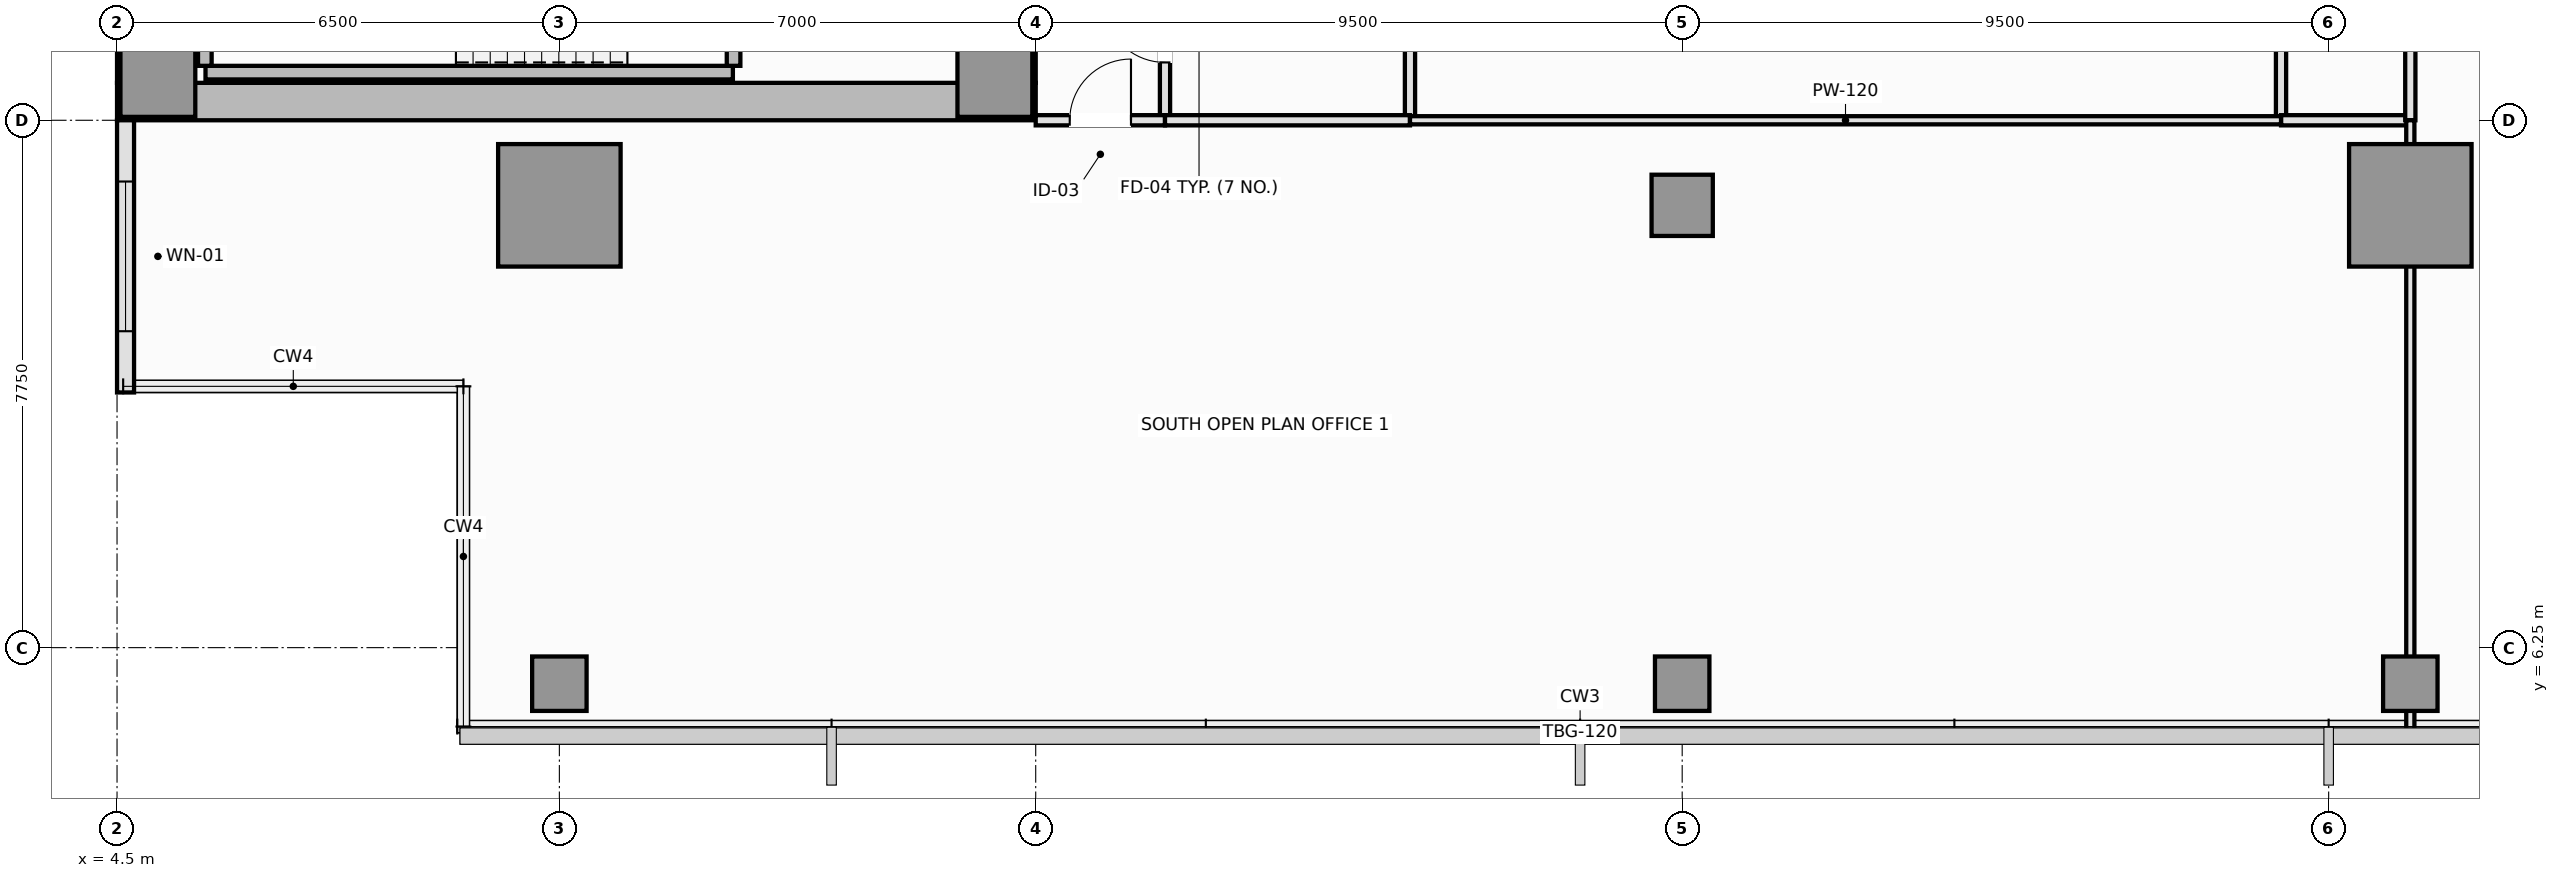
"""IFC4 building model, lengths in metres.
Left out: names, types, materials, properties, quantities, classifications, styles, units other than length and angle.
Written with IfcOpenShell. Run it as: python <this file> out.ifc"""

import sys

from ifc_helpers import new_model, si_unit, direction, frame, frame_2d, origin, origin_2d, place, context, subcontext, project, spatial, rectangle, extrude, element, fill, save


model = new_model("IFC4")
c1 = context("Model", 3, precision=1e-05, world=origin(), true_north=direction((0.0, 1.0)))
c2 = subcontext(c1, "Body", "Model", "MODEL_VIEW")
j1 = project(units=[si_unit("LENGTHUNIT", "METRE"), si_unit("PLANEANGLEUNIT", "RADIAN")], contexts=[c1])
p1 = place(None, origin())
s1 = spatial("IfcSite", under=j1, at=p1, CompositionType="ELEMENT")
p2 = place(p1, origin())
s2 = spatial("IfcBuilding", under=s1, at=p2, CompositionType="ELEMENT")
p3 = place(p2, frame((0.0, 0.0, 209.35)))
s3 = spatial("IfcBuildingStorey", under=s2, at=p3, CompositionType="ELEMENT", Elevation=209.35)
p4 = place(p3, frame((4.5, 14.275, 0.0), z_axis=(0.0, 0.0, 1.0), x_axis=(1.0, 0.0, 0.0)))
e1 = element("IfcWall", 1, at=p4, inside=s3, PredefinedType="SHEAR", context=c2, shape_type="SweptSolid", body=[
    extrude(rectangle(XDim=13.5, YDim=0.55, at=frame_2d((6.75, 0.0))), origin(), (0.0, 0.0, 1.0), 3.55),
])
p5 = place(p3, frame((4.775, 14.55, 0.0), z_axis=(0.0, 0.0, 1.0), x_axis=(0.0, 1.0, 0.0)))
e2 = element("IfcWall", 2, at=p5, inside=s3, PredefinedType="SHEAR", context=c2, shape_type="SweptSolid", body=[
    extrude(rectangle(XDim=21.4, YDim=0.55, at=frame_2d((10.7, 0.0))), origin(), (0.0, 0.0, 1.0), 3.55),
])
p6 = place(p3, frame((17.725, 14.55, 0.0), z_axis=(0.0, 0.0, 1.0), x_axis=(0.0, 1.0, 0.0)))
e3 = element("IfcWall", 3, at=p6, inside=s3, PredefinedType="SHEAR", context=c2, shape_type="SweptSolid", body=[
    extrude(rectangle(XDim=8.9, YDim=0.55, at=frame_2d((4.45, 0.0))), origin(), (0.0, 0.0, 1.0), 3.55),
])
p7 = place(p6, frame((4.35, 0.0, 0.0)))
e4 = element("IfcOpeningElement", 4, at=p7, cuts=e3, PredefinedType="OPENING", context=c2, shape_type="SweptSolid", body=[
    extrude(rectangle(XDim=1.1, YDim=2.15, at=frame_2d((0.55, 1.075))), frame((0.0, 0.285, 0.0), z_axis=(0.0, -1.0, 0.0), x_axis=(1.0, 0.0, 0.0)), (0.0, 0.0, 1.0), 0.57),
])
for number, where, z_axis, x_axis in (
    (5, (5.1, 14.6, 0.0), (0.0, 0.0, 1.0), (1.0, 0.0, 0.0)),
    (6, (17.4, 14.6, 0.0), (0.0, 0.0, 1.0), (1.0, 0.0, 0.0)),
):
    element("IfcColumn", number, at=place(p3, frame(where, z_axis=z_axis, x_axis=x_axis)), inside=s3, PredefinedType="PILASTER", context=c2, shape_type="SweptSolid", body=[
        extrude(rectangle(XDim=1.1, YDim=1.1, at=origin_2d()), origin(), (0.0, 0.0, 1.0), 3.55),
    ])
for number, where, z_axis, x_axis in (
    (7, (11.0, 12.75, 0.0), (0.0, 0.0, 1.0), (1.0, 0.0, 0.0)),
    (8, (38.2, 12.75, 0.0), (0.0, 0.0, 1.0), (1.0, 0.0, 0.0)),
):
    element("IfcColumn", number, at=place(p3, frame(where, z_axis=z_axis, x_axis=x_axis)), inside=s3, PredefinedType="COLUMN", context=c2, shape_type="SweptSolid", body=[
        extrude(rectangle(XDim=1.8, YDim=1.8, at=origin_2d()), origin(), (0.0, 0.0, 1.0), 3.55),
    ])
p8 = place(p3, frame((27.5, 12.75, 0.0), z_axis=(0.0, 0.0, 1.0), x_axis=(1.0, 0.0, 0.0)))
e9 = element("IfcColumn", 9, at=p8, inside=s3, PredefinedType="COLUMN", context=c2, shape_type="SweptSolid", body=[
    extrude(rectangle(XDim=0.9, YDim=0.9, at=origin_2d()), origin(), (0.0, 0.0, 1.0), 3.55),
])
for number, where, z_axis, x_axis in (
    (10, (11.0, 5.72, 0.0), (0.0, 0.0, 1.0), (1.0, 0.0, 0.0)),
    (11, (27.5, 5.72, 0.0), (0.0, 0.0, 1.0), (1.0, 0.0, 0.0)),
    (12, (38.2, 5.72, 0.0), (0.0, 0.0, 1.0), (1.0, 0.0, 0.0)),
):
    element("IfcColumn", number, at=place(p3, frame(where, z_axis=z_axis, x_axis=x_axis)), inside=s3, PredefinedType="COLUMN", context=c2, shape_type="SweptSolid", body=[
        extrude(rectangle(XDim=0.8, YDim=0.8, at=origin_2d()), origin(), (0.0, 0.0, 1.0), 3.55),
    ])
p9 = place(p3, frame((4.625, 14.0, 0.0), z_axis=(0.0, 0.0, 1.0), x_axis=(0.0, -1.0, 0.0)))
e13 = element("IfcWall", 13, at=p9, inside=s3, PredefinedType="SOLIDWALL", context=c2, shape_type="SweptSolid", body=[
    extrude(rectangle(XDim=4.0, YDim=0.25, at=frame_2d((2.0, 0.0))), origin(), (0.0, 0.0, 1.0), 3.37),
])
p10 = place(p9, frame((0.9, 0.0, 0.9)))
e14 = element("IfcOpeningElement", 14, at=p10, cuts=e13, PredefinedType="OPENING", context=c2, shape_type="SweptSolid", body=[
    extrude(rectangle(XDim=2.2, YDim=1.8, at=frame_2d((1.1, 0.9))), frame((0.0, 0.135, 0.0), z_axis=(0.0, -1.0, 0.0), x_axis=(1.0, 0.0, 0.0)), (0.0, 0.0, 1.0), 0.27),
])
p11 = place(p3, frame((5.8, 14.7, 0.0), z_axis=(0.0, 0.0, 1.0), x_axis=(1.0, 0.0, 0.0)))
e15 = element("IfcWall", 15, at=p11, inside=s3, PredefinedType="SOLIDWALL", context=c2, shape_type="SweptSolid", body=[
    extrude(rectangle(XDim=7.75, YDim=0.2, at=frame_2d((3.875, 0.0))), origin(), (0.0, 0.0, 1.0), 3.55),
])
p12 = place(p3, frame((5.79, 14.8, 0.0), z_axis=(0.0, 0.0, 1.0), x_axis=(0.0, 1.0, 0.0)))
e16 = element("IfcWall", 16, at=p12, inside=s3, PredefinedType="SOLIDWALL", context=c2, shape_type="SweptSolid", body=[
    extrude(rectangle(XDim=3.05, YDim=0.2, at=frame_2d((1.525, 0.0))), origin(), (0.0, 0.0, 1.0), 3.55),
])
p13 = place(p3, frame((13.56, 14.8, 0.0), z_axis=(0.0, 0.0, 1.0), x_axis=(0.0, 1.0, 0.0)))
e17 = element("IfcWall", 17, at=p13, inside=s3, PredefinedType="SOLIDWALL", context=c2, shape_type="SweptSolid", body=[
    extrude(rectangle(XDim=3.05, YDim=0.2, at=frame_2d((1.525, 0.0))), origin(), (0.0, 0.0, 1.0), 3.55),
])
p14 = place(p13, frame((0.95, 0.0, 0.0)))
e18 = element("IfcOpeningElement", 18, at=p14, cuts=e17, PredefinedType="OPENING", context=c2, shape_type="SweptSolid", body=[
    extrude(rectangle(XDim=1.15, YDim=2.15, at=frame_2d((0.575, 1.075))), frame((0.0, 0.11, 0.0), z_axis=(0.0, -1.0, 0.0), x_axis=(1.0, 0.0, 0.0)), (0.0, 0.0, 1.0), 0.22),
])
p15 = place(p3, frame((19.9, 14.0, 0.0), z_axis=(0.0, 0.0, 1.0), x_axis=(0.0, 1.0, 0.0)))
e19 = element("IfcWall", 19, at=p15, inside=s3, PredefinedType="PLUMBINGWALL", context=c2, shape_type="SweptSolid", body=[
    extrude(rectangle(XDim=2.6, YDim=0.15, at=frame_2d((1.3, 0.0))), origin(), (0.0, 0.0, 1.0), 3.37),
])
p16 = place(p15, frame((0.85, 0.0, 0.0)))
e20 = element("IfcOpeningElement", 20, at=p16, cuts=e19, PredefinedType="OPENING", context=c2, shape_type="SweptSolid", body=[
    extrude(rectangle(XDim=0.9, YDim=2.1, at=frame_2d((0.45, 1.05))), frame((0.0, 0.085, 0.0), z_axis=(0.0, -1.0, 0.0), x_axis=(1.0, 0.0, 0.0)), (0.0, 0.0, 1.0), 0.17),
])
p17 = place(p3, frame((18.0, 14.0, 0.0), z_axis=(0.0, 0.0, 1.0), x_axis=(1.0, 0.0, 0.0)))
e21 = element("IfcWall", 21, at=p17, inside=s3, PredefinedType="PARTITIONING", context=c2, shape_type="SweptSolid", body=[
    extrude(rectangle(XDim=1.9, YDim=0.15, at=frame_2d((0.95, 0.0))), origin(), (0.0, 0.0, 1.0), 3.37),
])
p18 = place(p17, frame((0.5, 0.0, 0.0)))
e22 = element("IfcOpeningElement", 22, at=p18, cuts=e21, PredefinedType="OPENING", context=c2, shape_type="SweptSolid", body=[
    extrude(rectangle(XDim=0.9, YDim=2.1, at=frame_2d((0.45, 1.05))), frame((0.0, 0.085, 0.0), z_axis=(0.0, -1.0, 0.0), x_axis=(1.0, 0.0, 0.0)), (0.0, 0.0, 1.0), 0.17),
])
p19 = place(p3, frame((36.3, 14.0, 0.0), z_axis=(0.0, 0.0, 1.0), x_axis=(0.0, 1.0, 0.0)))
e23 = element("IfcWall", 23, at=p19, inside=s3, PredefinedType="PARTITIONING", context=c2, shape_type="SweptSolid", body=[
    extrude(rectangle(XDim=4.7, YDim=0.15, at=frame_2d((2.35, 0.0))), origin(), (0.0, 0.0, 1.0), 3.37),
])
p20 = place(p19, frame((1.85, 0.0, 0.0)))
e24 = element("IfcOpeningElement", 24, at=p20, cuts=e23, PredefinedType="OPENING", context=c2, shape_type="SweptSolid", body=[
    extrude(rectangle(XDim=1.0, YDim=2.15, at=frame_2d((0.5, 1.075))), frame((0.0, 0.085, 0.0), z_axis=(0.0, -1.0, 0.0), x_axis=(1.0, 0.0, 0.0)), (0.0, 0.0, 1.0), 0.17),
])
p21 = place(p3, frame((36.3, 14.0, 0.0), z_axis=(0.0, 0.0, 1.0), x_axis=(1.0, 0.0, 0.0)))
e25 = element("IfcWall", 25, at=p21, inside=s3, PredefinedType="PARTITIONING", context=c2, shape_type="SweptSolid", body=[
    extrude(rectangle(XDim=1.9, YDim=0.15, at=frame_2d((0.95, 0.0))), origin(), (0.0, 0.0, 1.0), 3.37),
])
p22 = place(p3, frame((38.2, 14.0, 0.0), z_axis=(0.0, 0.0, 1.0), x_axis=(0.0, 1.0, 0.0)))
e26 = element("IfcWall", 26, at=p22, inside=s3, PredefinedType="PARTITIONING", context=c2, shape_type="SweptSolid", body=[
    extrude(rectangle(XDim=6.8, YDim=0.15, at=frame_2d((3.4, 0.0))), origin(), (0.0, 0.0, 1.0), 2.92),
])
p23 = place(p22, frame((2.679, 0.0, 0.0)))
e27 = element("IfcOpeningElement", 27, at=p23, cuts=e26, PredefinedType="OPENING", context=c2, shape_type="SweptSolid", body=[
    extrude(rectangle(XDim=1.0, YDim=2.15, at=frame_2d((0.5, 1.075))), frame((0.0, 0.085, 0.0), z_axis=(0.0, -1.0, 0.0), x_axis=(1.0, 0.0, 0.0)), (0.0, 0.0, 1.0), 0.17),
])
p24 = place(p3, frame((23.5, 14.0, 0.0), z_axis=(0.0, 0.0, 1.0), x_axis=(0.0, 1.0, 0.0)))
e28 = element("IfcWall", 28, at=p24, inside=s3, PredefinedType="PLUMBINGWALL", context=c2, shape_type="SweptSolid", body=[
    extrude(rectangle(XDim=2.6, YDim=0.15, at=frame_2d((1.3, 0.0))), origin(), (0.0, 0.0, 1.0), 3.37),
])
p25 = place(p3, frame((19.9, 14.0, 0.0), z_axis=(0.0, 0.0, 1.0), x_axis=(1.0, 0.0, 0.0)))
e29 = element("IfcWall", 29, at=p25, inside=s3, PredefinedType="PLUMBINGWALL", context=c2, shape_type="SweptSolid", body=[
    extrude(rectangle(XDim=3.6, YDim=0.15, at=frame_2d((1.8, 0.0))), origin(), (0.0, 0.0, 1.0), 3.37),
])
p26 = place(p3, frame((23.5, 14.0, 0.0), z_axis=(0.0, 0.0, 1.0), x_axis=(1.0, 0.0, 0.0)))
e30 = element("IfcWall", 30, at=p26, inside=s3, PredefinedType="PARTITIONING", context=c2, shape_type="SweptSolid", body=[
    extrude(rectangle(XDim=12.8, YDim=0.12, at=frame_2d((6.4, 0.0))), origin(), (0.0, 0.0, 1.0), 3.37),
])
p27 = place(p3, frame((38.2, 5.01, 0.0), z_axis=(0.0, 0.0, 1.0), x_axis=(0.0, 1.0, 0.0)))
e31 = element("IfcWall", 31, at=p27, inside=s3, PredefinedType="PARTITIONING", context=c2, shape_type="SweptSolid", body=[
    extrude(rectangle(XDim=8.99, YDim=0.12, at=frame_2d((4.495, 0.0))), origin(), (0.0, 0.0, 1.0), 2.92),
])
p28 = place(p10, origin())
e32 = element("IfcWindow", 32, at=p28, inside=s3, PartitioningType="SINGLE_PANEL", PredefinedType="WINDOW", context=c2, shape_type="SweptSolid", body=[
    extrude(rectangle(XDim=2.2, YDim=1.8, at=frame_2d((1.1, 0.9))), frame((0.0, 0.03, 0.0), z_axis=(0.0, -1.0, 0.0), x_axis=(1.0, 0.0, 0.0)), (0.0, 0.0, 1.0), 0.06),
])
fill(e14, e32)
p29 = place(p16, origin())
e33 = element("IfcDoor", 33, at=p29, inside=s3, OperationType="SINGLE_SWING_RIGHT", PredefinedType="DOOR", context=c2, shape_type="SweptSolid", body=[
    extrude(rectangle(XDim=0.9, YDim=2.1, at=frame_2d((0.45, 1.05))), frame((0.0, 0.025, 0.0), z_axis=(0.0, -1.0, 0.0), x_axis=(1.0, 0.0, 0.0)), (0.0, 0.0, 1.0), 0.05),
])
fill(e20, e33)
p30 = place(p18, origin())
e34 = element("IfcDoor", 34, at=p30, inside=s3, OperationType="SINGLE_SWING_RIGHT", PredefinedType="DOOR", context=c2, shape_type="SweptSolid", body=[
    extrude(rectangle(XDim=0.9, YDim=2.1, at=frame_2d((0.45, 1.05))), frame((0.0, 0.025, 0.0), z_axis=(0.0, -1.0, 0.0), x_axis=(1.0, 0.0, 0.0)), (0.0, 0.0, 1.0), 0.05),
])
fill(e22, e34)
save(model, sys.argv[1])
